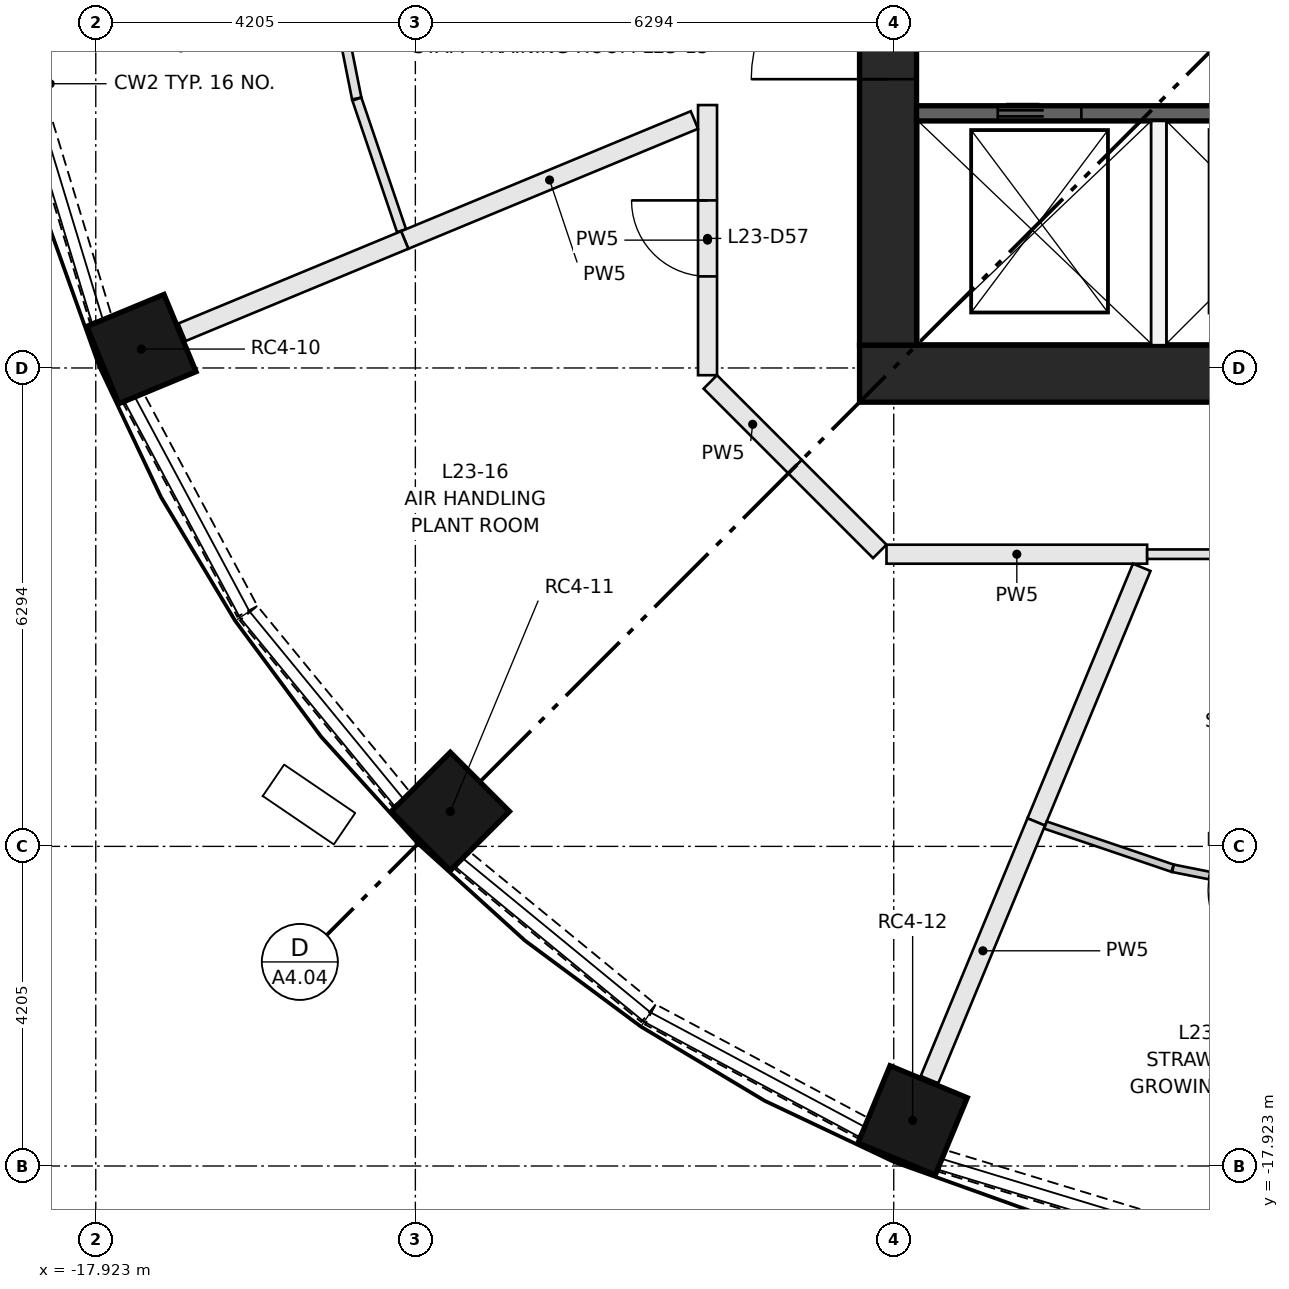
"""IFC4 building model, lengths in metres.
Left out: names, types, materials, properties, quantities, classifications, styles, units other than length and angle.
Written with IfcOpenShell. Run it as: python <this file> out.ifc"""

import sys

from ifc_helpers import new_model, si_unit, direction, frame, frame_2d, origin, origin_2d, place, context, subcontext, project, spatial, rectangle, extrude, element, fill, save


model = new_model("IFC4")
c1 = context("Model", 3, precision=1e-05, world=origin(), true_north=direction((0.0, 1.0)))
c2 = subcontext(c1, "Body", "Model", "MODEL_VIEW")
j1 = project(units=[si_unit("LENGTHUNIT", "METRE"), si_unit("PLANEANGLEUNIT", "RADIAN")], contexts=[c1])
p1 = place(None, origin())
s1 = spatial("IfcSite", under=j1, at=p1, CompositionType="ELEMENT")
p2 = place(p1, origin())
s2 = spatial("IfcBuilding", under=s1, at=p2, CompositionType="ELEMENT")
p3 = place(p2, frame((0.0, 0.0, 91.0)))
s3 = spatial("IfcBuildingStorey", under=s2, at=p3, CompositionType="ELEMENT", Elevation=91.0)
for number, where, z_axis, x_axis in (
    (1, (-17.323, -7.175, 0.0), (0.0, 0.0, 1.0), (-0.924, -0.383, 0.0)),
    (2, (-13.258, -13.258, 0.0), (0.0, 0.0, 1.0), (-0.707, -0.707, 0.0)),
    (3, (-7.175, -17.323, 0.0), (0.0, 0.0, 1.0), (-0.383, -0.924, 0.0)),
):
    element("IfcColumn", number, at=place(p3, frame(where, z_axis=z_axis, x_axis=x_axis)), inside=s3, PredefinedType="COLUMN", context=c2, shape_type="SweptSolid", body=[
        extrude(rectangle(XDim=1.1, YDim=1.1, at=origin_2d()), origin(), (0.0, 0.0, 1.0), 3.65),
    ])
p4 = place(p3, frame((-7.874, -7.499, 0.0), z_axis=(0.0, 0.0, 1.0), x_axis=(1.0, 0.0, 0.0)))
e4 = element("IfcWall", 4, at=p4, inside=s3, PredefinedType="SHEAR", context=c2, shape_type="SweptSolid", body=[
    extrude(rectangle(XDim=15.748, YDim=0.75, at=frame_2d((7.874, 0.0))), origin(), (0.0, 0.0, 1.0), 3.65),
])
p5 = place(p3, frame((-7.499, -7.124, 0.0), z_axis=(0.0, 0.0, 1.0), x_axis=(0.0, 1.0, 0.0)))
e5 = element("IfcWall", 5, at=p5, inside=s3, PredefinedType="SHEAR", context=c2, shape_type="SweptSolid", body=[
    extrude(rectangle(XDim=14.248, YDim=0.75, at=frame_2d((7.124, 0.0))), origin(), (0.0, 0.0, 1.0), 3.65),
])
p6 = place(p5, frame((6.624, 0.0, 0.0)))
e6 = element("IfcOpeningElement", 6, at=p6, cuts=e5, PredefinedType="OPENING", context=c2, shape_type="SweptSolid", body=[
    extrude(rectangle(XDim=1.0, YDim=2.1, at=frame_2d((0.5, 1.05))), frame((0.0, 0.385, 0.0), z_axis=(0.0, -1.0, 0.0), x_axis=(1.0, 0.0, 0.0)), (0.0, 0.0, 1.0), 0.77),
])
p7 = place(p5, frame((3.5, 0.0, 0.0)))
e7 = element("IfcOpeningElement", 7, at=p7, cuts=e5, PredefinedType="OPENING", context=c2, shape_type="SweptSolid", body=[
    extrude(rectangle(XDim=1.8, YDim=2.1, at=frame_2d((0.9, 1.05))), frame((0.0, 0.385, 0.0), z_axis=(0.0, -1.0, 0.0), x_axis=(1.0, 0.0, 0.0)), (0.0, 0.0, 1.0), 0.77),
])
p8 = place(p5, frame((8.948, 0.0, 0.0)))
e8 = element("IfcOpeningElement", 8, at=p8, cuts=e5, PredefinedType="OPENING", context=c2, shape_type="SweptSolid", body=[
    extrude(rectangle(XDim=1.8, YDim=2.1, at=frame_2d((0.9, 1.05))), frame((0.0, 0.385, 0.0), z_axis=(0.0, -1.0, 0.0), x_axis=(1.0, 0.0, 0.0)), (0.0, 0.0, 1.0), 0.77),
])
p9 = place(p5, frame((12.124, 0.0, 0.0)))
e9 = element("IfcOpeningElement", 9, at=p9, cuts=e5, PredefinedType="OPENING", context=c2, shape_type="SweptSolid", body=[
    extrude(rectangle(XDim=1.0, YDim=2.1, at=frame_2d((0.5, 1.05))), frame((0.0, 0.385, 0.0), z_axis=(0.0, -1.0, 0.0), x_axis=(1.0, 0.0, 0.0)), (0.0, 0.0, 1.0), 0.77),
])
p10 = place(p3, frame((-7.124, -4.074, 0.0), z_axis=(0.0, 0.0, 1.0), x_axis=(1.0, 0.0, 0.0)))
e10 = element("IfcWall", 10, at=p10, inside=s3, PredefinedType="SHEAR", context=c2, shape_type="SweptSolid", body=[
    extrude(rectangle(XDim=14.248, YDim=0.2, at=frame_2d((7.124, 0.0))), origin(), (0.0, 0.0, 1.0), 3.3),
])
p11 = place(p10, frame((1.069, 0.0, 0.0)))
e11 = element("IfcOpeningElement", 11, at=p11, cuts=e10, PredefinedType="OPENING", context=c2, shape_type="SweptSolid", body=[
    extrude(rectangle(XDim=1.1, YDim=2.1, at=frame_2d((0.55, 1.05))), frame((0.0, 0.11, 0.0), z_axis=(0.0, -1.0, 0.0), x_axis=(1.0, 0.0, 0.0)), (0.0, 0.0, 1.0), 0.22),
])
p12 = place(p10, frame((4.206, 0.0, 0.0)))
e12 = element("IfcOpeningElement", 12, at=p12, cuts=e10, PredefinedType="OPENING", context=c2, shape_type="SweptSolid", body=[
    extrude(rectangle(XDim=1.1, YDim=2.1, at=frame_2d((0.55, 1.05))), frame((0.0, 0.11, 0.0), z_axis=(0.0, -1.0, 0.0), x_axis=(1.0, 0.0, 0.0)), (0.0, 0.0, 1.0), 0.22),
])
p13 = place(p10, frame((6.808, 0.0, 0.0)))
e13 = element("IfcOpeningElement", 13, at=p13, cuts=e10, PredefinedType="OPENING", context=c2, shape_type="SweptSolid", body=[
    extrude(rectangle(XDim=1.0, YDim=2.1, at=frame_2d((0.5, 1.05))), frame((0.0, 0.11, 0.0), z_axis=(0.0, -1.0, 0.0), x_axis=(1.0, 0.0, 0.0)), (0.0, 0.0, 1.0), 0.22),
])
p14 = place(p10, frame((8.777, 0.0, 0.0)))
e14 = element("IfcOpeningElement", 14, at=p14, cuts=e10, PredefinedType="OPENING", context=c2, shape_type="SweptSolid", body=[
    extrude(rectangle(XDim=1.0, YDim=2.1, at=frame_2d((0.5, 1.05))), frame((0.0, 0.11, 0.0), z_axis=(0.0, -1.0, 0.0), x_axis=(1.0, 0.0, 0.0)), (0.0, 0.0, 1.0), 0.22),
])
p15 = place(p10, frame((10.745, 0.0, 0.0)))
e15 = element("IfcOpeningElement", 15, at=p15, cuts=e10, PredefinedType="OPENING", context=c2, shape_type="SweptSolid", body=[
    extrude(rectangle(XDim=1.0, YDim=2.1, at=frame_2d((0.5, 1.05))), frame((0.0, 0.11, 0.0), z_axis=(0.0, -1.0, 0.0), x_axis=(1.0, 0.0, 0.0)), (0.0, 0.0, 1.0), 0.22),
])
p16 = place(p10, frame((12.714, 0.0, 0.0)))
e16 = element("IfcOpeningElement", 16, at=p16, cuts=e10, PredefinedType="OPENING", context=c2, shape_type="SweptSolid", body=[
    extrude(rectangle(XDim=1.0, YDim=2.1, at=frame_2d((0.5, 1.05))), frame((0.0, 0.11, 0.0), z_axis=(0.0, -1.0, 0.0), x_axis=(1.0, 0.0, 0.0)), (0.0, 0.0, 1.0), 0.22),
])
p17 = place(p3, frame((-3.937, -7.124, 0.0), z_axis=(0.0, 0.0, 1.0), x_axis=(0.0, 1.0, 0.0)))
e17 = element("IfcWall", 17, at=p17, inside=s3, PredefinedType="PARTITIONING", context=c2, shape_type="SweptSolid", body=[
    extrude(rectangle(XDim=2.95, YDim=0.2, at=frame_2d((1.475, 0.0))), origin(), (0.0, 0.0, 1.0), 3.3),
])
p18 = place(p3, frame((-18.778, -3.75, 0.0), z_axis=(0.0, 0.0, 1.0), x_axis=(0.290325591482, -0.956927923582, 0.0)))
e18 = element("IfcWall", 18, at=p18, inside=s3, PredefinedType="SOLIDWALL", context=c2, shape_type="SweptSolid", body=[
    extrude(rectangle(XDim=3.173, YDim=0.3, at=frame_2d((1.586, 0.0))), origin(), (0.0, 0.0, 1.0), 0.9),
])
p19 = place(p3, frame((-17.425, -7.828, 0.0), z_axis=(0.0, 0.0, 1.0), x_axis=(0.471458802606, -0.88188808669, 0.0)))
e19 = element("IfcWall", 19, at=p19, inside=s3, PredefinedType="SOLIDWALL", context=c2, shape_type="SweptSolid", body=[
    extrude(rectangle(XDim=3.172, YDim=0.3, at=frame_2d((1.586, 0.0))), origin(), (0.0, 0.0, 1.0), 0.9),
])
for number, where, z_axis, x_axis in (
    (20, (-15.913, -10.651, 0.0), (0.0, 0.0, 1.0), (0.634, -0.773, 0.0)),
    (21, (-13.104, -13.9, 0.0), (0.0, 0.0, 1.0), (0.773, -0.634, 0.0)),
):
    element("IfcWall", number, at=place(p3, frame(where, z_axis=z_axis, x_axis=x_axis)), inside=s3, PredefinedType="SOLIDWALL", context=c2, shape_type="SweptSolid", body=[
        extrude(rectangle(XDim=3.173, YDim=0.3, at=frame_2d((1.586, 0.0))), origin(), (0.0, 0.0, 1.0), 0.9),
    ])
p20 = place(p3, frame((-10.626, -15.929, 0.0), z_axis=(0.0, 0.0, 1.0), x_axis=(0.88188808669, -0.471458802606, 0.0)))
e22 = element("IfcWall", 22, at=p20, inside=s3, PredefinedType="SOLIDWALL", context=c2, shape_type="SweptSolid", body=[
    extrude(rectangle(XDim=3.172, YDim=0.3, at=frame_2d((1.586, 0.0))), origin(), (0.0, 0.0, 1.0), 0.9),
])
p21 = place(p3, frame((-6.787, -17.856, 0.0), z_axis=(0.0, 0.0, 1.0), x_axis=(0.956927923582, -0.290325591482, 0.0)))
e23 = element("IfcWall", 23, at=p21, inside=s3, PredefinedType="SOLIDWALL", context=c2, shape_type="SweptSolid", body=[
    extrude(rectangle(XDim=3.173, YDim=0.3, at=frame_2d((1.586, 0.0))), origin(), (0.0, 0.0, 1.0), 0.9),
])
p22 = place(p3, frame((-9.874, -7.519, 0.0), z_axis=(0.0, 0.0, 1.0), x_axis=(0.0, 1.0, 0.0)))
e24 = element("IfcWall", 24, at=p22, inside=s3, PredefinedType="PARTITIONING", context=c2, shape_type="SweptSolid", body=[
    extrude(rectangle(XDim=3.554, YDim=0.25, at=frame_2d((1.777, 0.0))), origin(), (0.0, 0.0, 1.0), 3.3),
])
p23 = place(p22, frame((1.3, 0.0, 0.0)))
e25 = element("IfcOpeningElement", 25, at=p23, cuts=e24, PredefinedType="OPENING", context=c2, shape_type="SweptSolid", body=[
    extrude(rectangle(XDim=1.0, YDim=2.1, at=frame_2d((0.5, 1.05))), frame((0.0, 0.135, 0.0), z_axis=(0.0, -1.0, 0.0), x_axis=(1.0, 0.0, 0.0)), (0.0, 0.0, 1.0), 0.27),
])
for number, where, z_axis, x_axis in (
    (26, (-8.722, -8.722, 0.0), (0.0, 0.0, 1.0), (-0.707, 0.707, 0.0)),
    (27, (-7.608, -9.837, 0.0), (0.0, 0.0, 1.0), (-0.707, 0.707, 0.0)),
):
    element("IfcWall", number, at=place(p3, frame(where, z_axis=z_axis, x_axis=x_axis)), inside=s3, PredefinedType="PARTITIONING", context=c2, shape_type="SweptSolid", body=[
        extrude(rectangle(XDim=1.577, YDim=0.25, at=frame_2d((0.788, 0.0))), origin(), (0.0, 0.0, 1.0), 3.3),
    ])
p24 = place(p3, frame((-4.09, -9.874, 0.0), z_axis=(0.0, 0.0, 1.0), x_axis=(-1.0, 0.0, 0.0)))
e28 = element("IfcWall", 28, at=p24, inside=s3, PredefinedType="PARTITIONING", context=c2, shape_type="SweptSolid", body=[
    extrude(rectangle(XDim=3.429, YDim=0.25, at=frame_2d((1.715, 0.0))), origin(), (0.0, 0.0, 1.0), 3.3),
])
p25 = place(p3, frame((0.0, -9.874, 0.0), z_axis=(0.0, 0.0, 1.0), x_axis=(-1.0, 0.0, 0.0)))
e29 = element("IfcWall", 29, at=p25, inside=s3, PredefinedType="PARTITIONING", context=c2, shape_type="SweptSolid", body=[
    extrude(rectangle(XDim=4.09, YDim=0.125, at=frame_2d((2.045, 0.0))), origin(), (0.0, 0.0, 1.0), 3.3),
])
p26 = place(p25, frame((1.5, 0.0, 0.0)))
e30 = element("IfcOpeningElement", 30, at=p26, cuts=e29, PredefinedType="OPENING", context=c2, shape_type="SweptSolid", body=[
    extrude(rectangle(XDim=1.0, YDim=2.1, at=frame_2d((0.5, 1.05))), frame((0.0, 0.073, 0.0), z_axis=(0.0, -1.0, 0.0), x_axis=(1.0, 0.0, 0.0)), (0.0, 0.0, 1.0), 0.145),
])
p27 = place(p3, frame((-14.49, -3.878, 0.0), z_axis=(0.0, 0.0, 1.0), x_axis=(-0.195034785279, 0.980796325713, 0.0)))
e31 = element("IfcWall", 31, at=p27, inside=s3, PredefinedType="PARTITIONING", context=c2, shape_type="SweptSolid", body=[
    extrude(rectangle(XDim=1.954, YDim=0.125, at=frame_2d((0.977, 0.0))), origin(), (0.0, 0.0, 1.0), 3.3),
])
p28 = place(p3, frame((-13.9, -5.618, 0.0), z_axis=(0.0, 0.0, 1.0), x_axis=(-0.321390424162, 0.946946775303, 0.0)))
e32 = element("IfcWall", 32, at=p28, inside=s3, PredefinedType="PARTITIONING", context=c2, shape_type="SweptSolid", body=[
    extrude(rectangle(XDim=1.828, YDim=0.125, at=frame_2d((0.914, 0.0))), origin(), (0.0, 0.0, 1.0), 3.3),
])
p29 = place(p3, frame((-10.047, -4.162, 0.0), z_axis=(0.0, 0.0, 1.0), x_axis=(-0.92388555685, -0.382668888001, 0.0)))
e33 = element("IfcWall", 33, at=p29, inside=s3, PredefinedType="PARTITIONING", context=c2, shape_type="SweptSolid", body=[
    extrude(rectangle(XDim=4.125, YDim=0.25, at=frame_2d((2.062, 0.0))), origin(), (0.0, 0.0, 1.0), 3.3),
])
p30 = place(p3, frame((-13.858, -5.74, 0.0), z_axis=(0.0, 0.0, 1.0), x_axis=(-0.923876970079, -0.382689618566, 0.0)))
e34 = element("IfcWall", 34, at=p30, inside=s3, PredefinedType="PARTITIONING", context=c2, shape_type="SweptSolid", body=[
    extrude(rectangle(XDim=3.17, YDim=0.25, at=frame_2d((1.585, 0.0))), origin(), (0.0, 0.0, 1.0), 3.3),
])
p31 = place(p3, frame((-4.162, -10.047, 0.0), z_axis=(0.0, 0.0, 1.0), x_axis=(-0.382649180879, -0.923893719197, 0.0)))
e35 = element("IfcWall", 35, at=p31, inside=s3, PredefinedType="PARTITIONING", context=c2, shape_type="SweptSolid", body=[
    extrude(rectangle(XDim=3.625, YDim=0.25, at=frame_2d((1.812, 0.0))), origin(), (0.0, 0.0, 1.0), 3.3),
])
p32 = place(p3, frame((-5.549, -13.396, 0.0), z_axis=(0.0, 0.0, 1.0), x_axis=(-0.382706260748, -0.923870076355, 0.0)))
e36 = element("IfcWall", 36, at=p32, inside=s3, PredefinedType="PARTITIONING", context=c2, shape_type="SweptSolid", body=[
    extrude(rectangle(XDim=3.67, YDim=0.25, at=frame_2d((1.835, 0.0))), origin(), (0.0, 0.0, 1.0), 3.3),
])
p33 = place(p3, frame((-3.756, -14.005, 0.0), z_axis=(0.0, 0.0, 1.0), x_axis=(-0.946911786272, 0.321493497633, 0.0)))
e37 = element("IfcWall", 37, at=p33, inside=s3, PredefinedType="PARTITIONING", context=c2, shape_type="SweptSolid", body=[
    extrude(rectangle(XDim=1.765, YDim=0.1, at=frame_2d((0.882, 0.0))), origin(), (0.0, 0.0, 1.0), 3.3),
])
p34 = place(p3, frame((-1.896, -14.375, 0.0), z_axis=(0.0, 0.0, 1.0), x_axis=(-0.980773924018, 0.19514740574, 0.0)))
e38 = element("IfcWall", 38, at=p34, inside=s3, PredefinedType="PARTITIONING", context=c2, shape_type="SweptSolid", body=[
    extrude(rectangle(XDim=1.89, YDim=0.1, at=frame_2d((0.945, 0.0))), origin(), (0.0, 0.0, 1.0), 3.3),
])
p35 = place(p34, frame((0.4, 0.0, 0.0)))
e39 = element("IfcOpeningElement", 39, at=p35, cuts=e38, PredefinedType="OPENING", context=c2, shape_type="SweptSolid", body=[
    extrude(rectangle(XDim=1.0, YDim=2.1, at=frame_2d((0.5, 1.05))), frame((0.0, 0.06, 0.0), z_axis=(0.0, -1.0, 0.0), x_axis=(1.0, 0.0, 0.0)), (0.0, 0.0, 1.0), 0.12),
])
p36 = place(p11, origin())
e40 = element("IfcDoor", 40, at=p36, inside=s3, OperationType="DOUBLE_DOOR_SLIDING", PredefinedType="DOOR", context=c2, shape_type="SweptSolid", body=[
    extrude(rectangle(XDim=1.1, YDim=2.1, at=frame_2d((0.55, 1.05))), frame((0.0, 0.025, 0.0), z_axis=(0.0, -1.0, 0.0), x_axis=(1.0, 0.0, 0.0)), (0.0, 0.0, 1.0), 0.05),
])
fill(e11, e40)
p37 = place(p7, origin())
e41 = element("IfcDoor", 41, at=p37, inside=s3, OperationType="DOUBLE_DOOR_SINGLE_SWING", PredefinedType="DOOR", context=c2, shape_type="SweptSolid", body=[
    extrude(rectangle(XDim=1.8, YDim=2.1, at=frame_2d((0.9, 1.05))), frame((0.0, 0.025, 0.0), z_axis=(0.0, -1.0, 0.0), x_axis=(1.0, 0.0, 0.0)), (0.0, 0.0, 1.0), 0.05),
])
fill(e7, e41)
p38 = place(p23, origin())
e42 = element("IfcDoor", 42, at=p38, inside=s3, OperationType="SINGLE_SWING_RIGHT", PredefinedType="DOOR", context=c2, shape_type="SweptSolid", body=[
    extrude(rectangle(XDim=1.0, YDim=2.1, at=frame_2d((0.5, 1.05))), frame((0.0, 0.025, 0.0), z_axis=(0.0, -1.0, 0.0), x_axis=(1.0, 0.0, 0.0)), (0.0, 0.0, 1.0), 0.05),
])
fill(e25, e42)
save(model, sys.argv[1])
